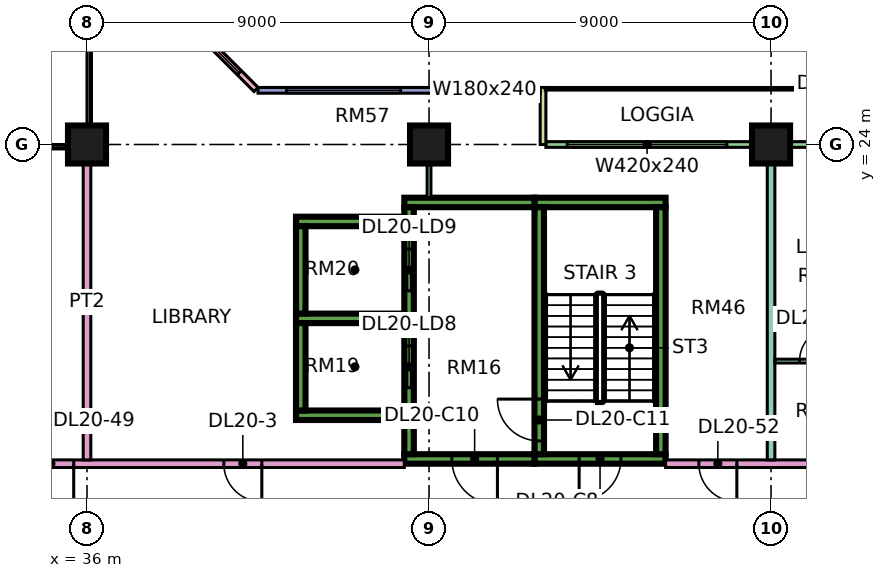
"""IFC4 building model, lengths in metres.
Left out: names, types, materials, properties, quantities, classifications, styles, units other than length and angle.
Written with IfcOpenShell. Run it as: python <this file> out.ifc"""

import sys

from ifc_helpers import new_model, si_unit, direction, frame, frame_2d, origin, origin_2d, place, context, subcontext, project, spatial, rectangle, extrude, element, fill, save


model = new_model("IFC4")
c1 = context("Model", 3, precision=1e-05, world=origin(), true_north=direction((0.0, 1.0)))
c2 = subcontext(c1, "Body", "Model", "MODEL_VIEW")
j1 = project(units=[si_unit("LENGTHUNIT", "METRE"), si_unit("PLANEANGLEUNIT", "RADIAN")], contexts=[c1])
p1 = place(None, origin())
s1 = spatial("IfcSite", under=j1, at=p1, CompositionType="ELEMENT")
p2 = place(p1, origin())
s2 = spatial("IfcBuilding", under=s1, at=p2, CompositionType="ELEMENT")
p3 = place(p2, frame((0.0, 0.0, 91.9)))
s3 = spatial("IfcBuildingStorey", under=s2, at=p3, CompositionType="ELEMENT", Elevation=91.9)
for number, where, z_axis, x_axis in (
    (1, (36.0, 24.0, 0.0), (0.0, 0.0, 1.0), (1.0, 0.0, 0.0)),
    (2, (45.0, 24.0, 0.0), (0.0, 0.0, 1.0), (1.0, 0.0, 0.0)),
    (3, (54.0, 24.0, 0.0), (0.0, 0.0, 1.0), (1.0, 0.0, 0.0)),
):
    element("IfcColumn", number, at=place(p3, frame(where, z_axis=z_axis, x_axis=x_axis)), inside=s3, PredefinedType="COLUMN", context=c2, shape_type="SweptSolid", body=[
        extrude(rectangle(XDim=1.0, YDim=1.0, at=origin_2d()), origin(), (0.0, 0.0, 1.0), 3.75),
    ])
p4 = place(p3, frame((47.775, 15.725, 0.0), z_axis=(0.0, 0.0, 1.0), x_axis=(1.0, 0.0, 0.0)))
e4 = element("IfcWall", 4, at=p4, inside=s3, PredefinedType="SHEAR", context=c2, shape_type="SweptSolid", body=[
    extrude(rectangle(XDim=3.45, YDim=0.25, at=frame_2d((1.725, 0.0))), origin(), (0.0, 0.0, 1.0), 3.75),
])
p5 = place(p4, frame((1.175, 0.0, 0.0)))
e5 = element("IfcOpeningElement", 5, at=p5, cuts=e4, PredefinedType="OPENING", context=c2, shape_type="SweptSolid", body=[
    extrude(rectangle(XDim=1.1, YDim=2.2, at=frame_2d((0.55, 1.1))), frame((0.0, 0.135, 0.0), z_axis=(0.0, -1.0, 0.0), x_axis=(1.0, 0.0, 0.0)), (0.0, 0.0, 1.0), 0.27),
])
p6 = place(p3, frame((47.775, 22.475, 0.0), z_axis=(0.0, 0.0, 1.0), x_axis=(1.0, 0.0, 0.0)))
e6 = element("IfcWall", 6, at=p6, inside=s3, PredefinedType="SHEAR", context=c2, shape_type="SweptSolid", body=[
    extrude(rectangle(XDim=3.45, YDim=0.25, at=frame_2d((1.725, 0.0))), origin(), (0.0, 0.0, 1.0), 3.75),
])
p7 = place(p3, frame((47.9, 15.85, 0.0), z_axis=(0.0, 0.0, 1.0), x_axis=(0.0, 1.0, 0.0)))
e7 = element("IfcWall", 7, at=p7, inside=s3, PredefinedType="SHEAR", context=c2, shape_type="SweptSolid", body=[
    extrude(rectangle(XDim=6.5, YDim=0.25, at=frame_2d((3.25, 0.0))), origin(), (0.0, 0.0, 1.0), 3.75),
])
p8 = place(p7, frame((0.35, 0.0, 0.0)))
e8 = element("IfcOpeningElement", 8, at=p8, cuts=e7, PredefinedType="OPENING", context=c2, shape_type="SweptSolid", body=[
    extrude(rectangle(XDim=1.1, YDim=2.2, at=frame_2d((0.55, 1.1))), frame((0.0, 0.135, 0.0), z_axis=(0.0, -1.0, 0.0), x_axis=(1.0, 0.0, 0.0)), (0.0, 0.0, 1.0), 0.27),
])
p9 = place(p3, frame((51.1, 15.85, 0.0), z_axis=(0.0, 0.0, 1.0), x_axis=(0.0, 1.0, 0.0)))
e9 = element("IfcWall", 9, at=p9, inside=s3, PredefinedType="SHEAR", context=c2, shape_type="SweptSolid", body=[
    extrude(rectangle(XDim=6.5, YDim=0.25, at=frame_2d((3.25, 0.0))), origin(), (0.0, 0.0, 1.0), 3.75),
])
p10 = place(p3, frame((44.35, 15.725, 0.0), z_axis=(0.0, 0.0, 1.0), x_axis=(1.0, 0.0, 0.0)))
e10 = element("IfcWall", 10, at=p10, inside=s3, PredefinedType="SHEAR", context=c2, shape_type="SweptSolid", body=[
    extrude(rectangle(XDim=3.425, YDim=0.25, at=frame_2d((1.712, 0.0))), origin(), (0.0, 0.0, 1.0), 3.75),
])
p11 = place(p10, frame((1.25, 0.0, 0.0)))
e11 = element("IfcOpeningElement", 11, at=p11, cuts=e10, PredefinedType="OPENING", context=c2, shape_type="SweptSolid", body=[
    extrude(rectangle(XDim=1.2, YDim=2.2, at=frame_2d((0.6, 1.1))), frame((0.0, 0.135, 0.0), z_axis=(0.0, -1.0, 0.0), x_axis=(1.0, 0.0, 0.0)), (0.0, 0.0, 1.0), 0.27),
])
p12 = place(p3, frame((44.35, 22.475, 0.0), z_axis=(0.0, 0.0, 1.0), x_axis=(1.0, 0.0, 0.0)))
e12 = element("IfcWall", 12, at=p12, inside=s3, PredefinedType="SHEAR", context=c2, shape_type="SweptSolid", body=[
    extrude(rectangle(XDim=3.425, YDim=0.25, at=frame_2d((1.712, 0.0))), origin(), (0.0, 0.0, 1.0), 3.75),
])
p13 = place(p3, frame((44.475, 15.85, 0.0), z_axis=(0.0, 0.0, 1.0), x_axis=(0.0, 1.0, 0.0)))
e13 = element("IfcWall", 13, at=p13, inside=s3, PredefinedType="SHEAR", context=c2, shape_type="SweptSolid", body=[
    extrude(rectangle(XDim=6.5, YDim=0.25, at=frame_2d((3.25, 0.0))), origin(), (0.0, 0.0, 1.0), 3.75),
])
p14 = place(p13, frame((1.75, 0.0, 0.0)))
e14 = element("IfcOpeningElement", 14, at=p14, cuts=e13, PredefinedType="OPENING", context=c2, shape_type="SweptSolid", body=[
    extrude(rectangle(XDim=1.1, YDim=2.2, at=frame_2d((0.55, 1.1))), frame((0.0, 0.135, 0.0), z_axis=(0.0, -1.0, 0.0), x_axis=(1.0, 0.0, 0.0)), (0.0, 0.0, 1.0), 0.27),
])
p15 = place(p13, frame((4.3, 0.0, 0.0)))
e15 = element("IfcOpeningElement", 15, at=p15, cuts=e13, PredefinedType="OPENING", context=c2, shape_type="SweptSolid", body=[
    extrude(rectangle(XDim=1.1, YDim=2.2, at=frame_2d((0.55, 1.1))), frame((0.0, 0.135, 0.0), z_axis=(0.0, -1.0, 0.0), x_axis=(1.0, 0.0, 0.0)), (0.0, 0.0, 1.0), 0.27),
])
for number, where, z_axis, x_axis in (
    (16, (41.5, 16.875, 0.0), (0.0, 0.0, 1.0), (1.0, 0.0, 0.0)),
    (17, (41.5, 19.425, 0.0), (0.0, 0.0, 1.0), (1.0, 0.0, 0.0)),
    (18, (41.5, 21.975, 0.0), (0.0, 0.0, 1.0), (1.0, 0.0, 0.0)),
):
    element("IfcWall", number, at=place(p3, frame(where, z_axis=z_axis, x_axis=x_axis)), inside=s3, PredefinedType="SHEAR", context=c2, shape_type="SweptSolid", body=[
        extrude(rectangle(XDim=2.85, YDim=0.25, at=frame_2d((1.425, 0.0))), origin(), (0.0, 0.0, 1.0), 3.75),
    ])
for number, where, z_axis, x_axis in (
    (19, (41.625, 17.0, 0.0), (0.0, 0.0, 1.0), (0.0, 1.0, 0.0)),
    (20, (41.625, 19.55, 0.0), (0.0, 0.0, 1.0), (0.0, 1.0, 0.0)),
):
    element("IfcWall", number, at=place(p3, frame(where, z_axis=z_axis, x_axis=x_axis)), inside=s3, PredefinedType="SHEAR", context=c2, shape_type="SweptSolid", body=[
        extrude(rectangle(XDim=2.3, YDim=0.25, at=frame_2d((1.15, 0.0))), origin(), (0.0, 0.0, 1.0), 3.75),
    ])
p16 = place(p3, frame((59.925, 24.0, 0.0), z_axis=(0.0, 0.0, 1.0), x_axis=(-1.0, 0.0, 0.0)))
e21 = element("IfcWall", 21, at=p16, inside=s3, PredefinedType="SOLIDWALL", context=c2, shape_type="SweptSolid", body=[
    extrude(rectangle(XDim=11.85, YDim=0.15, at=frame_2d((5.925, 0.0))), origin(), (0.0, 0.0, 1.0), 3.35),
])
p17 = place(p16, frame((0.562, 0.0, 0.45)))
e22 = element("IfcOpeningElement", 22, at=p17, cuts=e21, PredefinedType="OPENING", context=c2, shape_type="SweptSolid", body=[
    extrude(rectangle(XDim=1.8, YDim=2.4, at=frame_2d((0.9, 1.2))), frame((0.0, 0.085, 0.0), z_axis=(0.0, -1.0, 0.0), x_axis=(1.0, 0.0, 0.0)), (0.0, 0.0, 1.0), 0.17),
])
p18 = place(p16, frame((3.525, 0.0, 0.0)))
e23 = element("IfcOpeningElement", 23, at=p18, cuts=e21, PredefinedType="OPENING", context=c2, shape_type="SweptSolid", body=[
    extrude(rectangle(XDim=1.2, YDim=2.4, at=frame_2d((0.6, 1.2))), frame((0.0, 0.085, 0.0), z_axis=(0.0, -1.0, 0.0), x_axis=(1.0, 0.0, 0.0)), (0.0, 0.0, 1.0), 0.17),
])
p19 = place(p16, frame((7.087, 0.0, 0.45)))
e24 = element("IfcOpeningElement", 24, at=p19, cuts=e21, PredefinedType="OPENING", context=c2, shape_type="SweptSolid", body=[
    extrude(rectangle(XDim=4.2, YDim=2.4, at=frame_2d((2.1, 1.2))), frame((0.0, 0.085, 0.0), z_axis=(0.0, -1.0, 0.0), x_axis=(1.0, 0.0, 0.0)), (0.0, 0.0, 1.0), 0.17),
])
p20 = place(p3, frame((48.0, 25.5, 0.0), z_axis=(0.0, 0.0, 1.0), x_axis=(0.0, -1.0, 0.0)))
e25 = element("IfcWall", 25, at=p20, inside=s3, PredefinedType="SOLIDWALL", context=c2, shape_type="SweptSolid", body=[
    extrude(rectangle(XDim=1.5, YDim=0.15, at=frame_2d((0.75, 0.0))), origin(), (0.0, 0.0, 1.0), 3.35),
])
p21 = place(p3, frame((47.925, 25.425, 0.0), z_axis=(0.0, 0.0, 1.0), x_axis=(-1.0, 0.0, 0.0)))
e26 = element("IfcWall", 26, at=p21, inside=s3, PredefinedType="SOLIDWALL", context=c2, shape_type="SweptSolid", body=[
    extrude(rectangle(XDim=7.425, YDim=0.15, at=frame_2d((3.712, 0.0))), origin(), (0.0, 0.0, 1.0), 3.35),
])
p22 = place(p21, frame((0.562, 0.0, 0.45)))
e27 = element("IfcOpeningElement", 27, at=p22, cuts=e26, PredefinedType="OPENING", context=c2, shape_type="SweptSolid", body=[
    extrude(rectangle(XDim=1.8, YDim=2.4, at=frame_2d((0.9, 1.2))), frame((0.0, 0.085, 0.0), z_axis=(0.0, -1.0, 0.0), x_axis=(1.0, 0.0, 0.0)), (0.0, 0.0, 1.0), 0.17),
])
p23 = place(p21, frame((3.675, 0.0, 0.45)))
e28 = element("IfcOpeningElement", 28, at=p23, cuts=e26, PredefinedType="OPENING", context=c2, shape_type="SweptSolid", body=[
    extrude(rectangle(XDim=3.0, YDim=2.4, at=frame_2d((1.5, 1.2))), frame((0.0, 0.085, 0.0), z_axis=(0.0, -1.0, 0.0), x_axis=(1.0, 0.0, 0.0)), (0.0, 0.0, 1.0), 0.17),
])
p24 = place(p3, frame((40.447, 25.447, 0.0), z_axis=(0.0, 0.0, 1.0), x_axis=(-0.707106781187, 0.707106781187, 0.0)))
e29 = element("IfcWall", 29, at=p24, inside=s3, PredefinedType="SOLIDWALL", context=c2, shape_type="SweptSolid", body=[
    extrude(rectangle(XDim=4.243, YDim=0.15, at=frame_2d((2.121, 0.0))), origin(), (0.0, 0.0, 1.0), 3.35),
])
p25 = place(p24, frame((0.621, 0.0, 0.45)))
e30 = element("IfcOpeningElement", 30, at=p25, cuts=e29, PredefinedType="OPENING", context=c2, shape_type="SweptSolid", body=[
    extrude(rectangle(XDim=3.0, YDim=2.4, at=frame_2d((1.5, 1.2))), frame((0.0, 0.085, 0.0), z_axis=(0.0, -1.0, 0.0), x_axis=(1.0, 0.0, 0.0)), (0.0, 0.0, 1.0), 0.17),
])
p26 = place(p3, frame((34.0, 15.6, 0.0), z_axis=(0.0, 0.0, 1.0), x_axis=(1.0, 0.0, 0.0)))
e31 = element("IfcWall", 31, at=p26, inside=s3, PredefinedType="PARTITIONING", context=c2, shape_type="SweptSolid", body=[
    extrude(rectangle(XDim=10.35, YDim=0.2, at=frame_2d((5.175, 0.0))), origin(), (0.0, 0.0, 1.0), 3.35),
])
p27 = place(p26, frame((5.6, 0.0, 0.0)))
e32 = element("IfcOpeningElement", 32, at=p27, cuts=e31, PredefinedType="OPENING", context=c2, shape_type="SweptSolid", body=[
    extrude(rectangle(XDim=1.0, YDim=2.1, at=frame_2d((0.5, 1.05))), frame((0.0, 0.11, 0.0), z_axis=(0.0, -1.0, 0.0), x_axis=(1.0, 0.0, 0.0)), (0.0, 0.0, 1.0), 0.22),
])
p28 = place(p26, frame((0.45, 0.0, 0.0)))
e33 = element("IfcOpeningElement", 33, at=p28, cuts=e31, PredefinedType="OPENING", context=c2, shape_type="SweptSolid", body=[
    extrude(rectangle(XDim=1.2, YDim=2.1, at=frame_2d((0.6, 1.05))), frame((0.0, 0.11, 0.0), z_axis=(0.0, -1.0, 0.0), x_axis=(1.0, 0.0, 0.0)), (0.0, 0.0, 1.0), 0.22),
])
p29 = place(p3, frame((36.0, 15.7, 0.0), z_axis=(0.0, 0.0, 1.0), x_axis=(0.0, 1.0, 0.0)))
e34 = element("IfcWall", 34, at=p29, inside=s3, PredefinedType="PARTITIONING", context=c2, shape_type="SweptSolid", body=[
    extrude(rectangle(XDim=8.3, YDim=0.2, at=frame_2d((4.15, 0.0))), origin(), (0.0, 0.0, 1.0), 3.35),
])
p30 = place(p3, frame((45.0, 22.6, 0.0), z_axis=(0.0, 0.0, 1.0), x_axis=(0.0, 1.0, 0.0)))
e35 = element("IfcWall", 35, at=p30, inside=s3, PredefinedType="PARTITIONING", context=c2, shape_type="SweptSolid", body=[
    extrude(rectangle(XDim=1.4, YDim=0.1, at=frame_2d((0.7, 0.0))), origin(), (0.0, 0.0, 1.0), 3.35),
])
p31 = place(p3, frame((51.225, 15.6, 0.0), z_axis=(0.0, 0.0, 1.0), x_axis=(1.0, 0.0, 0.0)))
e36 = element("IfcWall", 36, at=p31, inside=s3, PredefinedType="PARTITIONING", context=c2, shape_type="SweptSolid", body=[
    extrude(rectangle(XDim=22.125, YDim=0.2, at=frame_2d((11.062, 0.0))), origin(), (0.0, 0.0, 1.0), 3.35),
])
p32 = place(p31, frame((6.125, 0.0, 0.0)))
e37 = element("IfcOpeningElement", 37, at=p32, cuts=e36, PredefinedType="OPENING", context=c2, shape_type="SweptSolid", body=[
    extrude(rectangle(XDim=1.0, YDim=2.1, at=frame_2d((0.5, 1.05))), frame((0.0, 0.11, 0.0), z_axis=(0.0, -1.0, 0.0), x_axis=(1.0, 0.0, 0.0)), (0.0, 0.0, 1.0), 0.22),
])
p33 = place(p31, frame((0.875, 0.0, 0.0)))
e38 = element("IfcOpeningElement", 38, at=p33, cuts=e36, PredefinedType="OPENING", context=c2, shape_type="SweptSolid", body=[
    extrude(rectangle(XDim=1.0, YDim=2.1, at=frame_2d((0.5, 1.05))), frame((0.0, 0.11, 0.0), z_axis=(0.0, -1.0, 0.0), x_axis=(1.0, 0.0, 0.0)), (0.0, 0.0, 1.0), 0.22),
])
p34 = place(p3, frame((54.0, 15.7, 0.0), z_axis=(0.0, 0.0, 1.0), x_axis=(0.0, 1.0, 0.0)))
e39 = element("IfcWall", 39, at=p34, inside=s3, PredefinedType="PARTITIONING", context=c2, shape_type="SweptSolid", body=[
    extrude(rectangle(XDim=8.226, YDim=0.2, at=frame_2d((4.113, 0.0))), origin(), (0.0, 0.0, 1.0), 3.35),
])
p35 = place(p3, frame((54.1, 18.3, 0.0), z_axis=(0.0, 0.0, 1.0), x_axis=(1.0, 0.0, 0.0)))
e40 = element("IfcWall", 40, at=p35, inside=s3, PredefinedType="PARTITIONING", context=c2, shape_type="SweptSolid", body=[
    extrude(rectangle(XDim=2.25, YDim=0.1, at=frame_2d((1.125, 0.0))), origin(), (0.0, 0.0, 1.0), 3.35),
])
p36 = place(p35, frame((0.65, 0.0, 0.0)))
e41 = element("IfcOpeningElement", 41, at=p36, cuts=e40, PredefinedType="OPENING", context=c2, shape_type="SweptSolid", body=[
    extrude(rectangle(XDim=0.9, YDim=2.1, at=frame_2d((0.45, 1.05))), frame((0.0, 0.06, 0.0), z_axis=(0.0, -1.0, 0.0), x_axis=(1.0, 0.0, 0.0)), (0.0, 0.0, 1.0), 0.12),
])
p37 = place(p19, origin())
e42 = element("IfcWindow", 42, at=p37, inside=s3, PartitioningType="SINGLE_PANEL", PredefinedType="WINDOW", context=c2, shape_type="SweptSolid", body=[
    extrude(rectangle(XDim=4.2, YDim=2.4, at=frame_2d((2.1, 1.2))), frame((0.0, 0.03, 0.0), z_axis=(0.0, -1.0, 0.0), x_axis=(1.0, 0.0, 0.0)), (0.0, 0.0, 1.0), 0.06),
])
fill(e24, e42)
p38 = place(p22, origin())
e43 = element("IfcWindow", 43, at=p38, inside=s3, PartitioningType="SINGLE_PANEL", PredefinedType="WINDOW", context=c2, shape_type="SweptSolid", body=[
    extrude(rectangle(XDim=1.8, YDim=2.4, at=frame_2d((0.9, 1.2))), frame((0.0, 0.03, 0.0), z_axis=(0.0, -1.0, 0.0), x_axis=(1.0, 0.0, 0.0)), (0.0, 0.0, 1.0), 0.06),
])
fill(e27, e43)
p39 = place(p23, origin())
e44 = element("IfcWindow", 44, at=p39, inside=s3, PartitioningType="SINGLE_PANEL", PredefinedType="WINDOW", context=c2, shape_type="SweptSolid", body=[
    extrude(rectangle(XDim=3.0, YDim=2.4, at=frame_2d((1.5, 1.2))), frame((0.0, 0.03, 0.0), z_axis=(0.0, -1.0, 0.0), x_axis=(1.0, 0.0, 0.0)), (0.0, 0.0, 1.0), 0.06),
])
fill(e28, e44)
p40 = place(p25, origin())
e45 = element("IfcWindow", 45, at=p40, inside=s3, PartitioningType="SINGLE_PANEL", PredefinedType="WINDOW", context=c2, shape_type="SweptSolid", body=[
    extrude(rectangle(XDim=3.0, YDim=2.4, at=frame_2d((1.5, 1.2))), frame((0.0, 0.03, 0.0), z_axis=(0.0, -1.0, 0.0), x_axis=(1.0, 0.0, 0.0)), (0.0, 0.0, 1.0), 0.06),
])
fill(e30, e45)
p41 = place(p5, frame((1.1, 0.0, 0.0), z_axis=(0.0, 0.0, 1.0), x_axis=(-1.0, 0.0, 0.0)))
e46 = element("IfcDoor", 46, at=p41, inside=s3, OperationType="SINGLE_SWING_LEFT", PredefinedType="DOOR", context=c2, shape_type="SweptSolid", body=[
    extrude(rectangle(XDim=1.1, YDim=2.2, at=frame_2d((0.55, 1.1))), frame((0.0, 0.025, 0.0), z_axis=(0.0, -1.0, 0.0), x_axis=(1.0, 0.0, 0.0)), (0.0, 0.0, 1.0), 0.05),
])
fill(e5, e46)
p42 = place(p11, origin())
e47 = element("IfcDoor", 47, at=p42, inside=s3, OperationType="SINGLE_SWING_RIGHT", PredefinedType="DOOR", context=c2, shape_type="SweptSolid", body=[
    extrude(rectangle(XDim=1.2, YDim=2.2, at=frame_2d((0.6, 1.1))), frame((0.0, 0.025, 0.0), z_axis=(0.0, -1.0, 0.0), x_axis=(1.0, 0.0, 0.0)), (0.0, 0.0, 1.0), 0.05),
])
fill(e11, e47)
p43 = place(p8, frame((1.1, 0.0, 0.0), z_axis=(0.0, 0.0, 1.0), x_axis=(-1.0, 0.0, 0.0)))
e48 = element("IfcDoor", 48, at=p43, inside=s3, OperationType="SINGLE_SWING_RIGHT", PredefinedType="DOOR", context=c2, shape_type="SweptSolid", body=[
    extrude(rectangle(XDim=1.1, YDim=2.2, at=frame_2d((0.55, 1.1))), frame((0.0, 0.025, 0.0), z_axis=(0.0, -1.0, 0.0), x_axis=(1.0, 0.0, 0.0)), (0.0, 0.0, 1.0), 0.05),
])
fill(e8, e48)
p44 = place(p14, origin())
e49 = element("IfcDoor", 49, at=p44, inside=s3, OperationType="DOUBLE_DOOR_SLIDING", PredefinedType="DOOR", context=c2, shape_type="SweptSolid", body=[
    extrude(rectangle(XDim=1.1, YDim=2.2, at=frame_2d((0.55, 1.1))), frame((0.0, 0.025, 0.0), z_axis=(0.0, -1.0, 0.0), x_axis=(1.0, 0.0, 0.0)), (0.0, 0.0, 1.0), 0.05),
])
fill(e14, e49)
p45 = place(p15, origin())
e50 = element("IfcDoor", 50, at=p45, inside=s3, OperationType="DOUBLE_DOOR_SLIDING", PredefinedType="DOOR", context=c2, shape_type="SweptSolid", body=[
    extrude(rectangle(XDim=1.1, YDim=2.2, at=frame_2d((0.55, 1.1))), frame((0.0, 0.025, 0.0), z_axis=(0.0, -1.0, 0.0), x_axis=(1.0, 0.0, 0.0)), (0.0, 0.0, 1.0), 0.05),
])
fill(e15, e50)
p46 = place(p27, origin())
e51 = element("IfcDoor", 51, at=p46, inside=s3, OperationType="SINGLE_SWING_RIGHT", PredefinedType="DOOR", context=c2, shape_type="SweptSolid", body=[
    extrude(rectangle(XDim=1.0, YDim=2.1, at=frame_2d((0.5, 1.05))), frame((0.0, 0.025, 0.0), z_axis=(0.0, -1.0, 0.0), x_axis=(1.0, 0.0, 0.0)), (0.0, 0.0, 1.0), 0.05),
])
fill(e32, e51)
p47 = place(p36, frame((0.9, 0.0, 0.0), z_axis=(0.0, 0.0, 1.0), x_axis=(-1.0, 0.0, 0.0)))
e52 = element("IfcDoor", 52, at=p47, inside=s3, OperationType="SINGLE_SWING_RIGHT", PredefinedType="DOOR", context=c2, shape_type="SweptSolid", body=[
    extrude(rectangle(XDim=0.9, YDim=2.1, at=frame_2d((0.45, 1.05))), frame((0.0, 0.025, 0.0), z_axis=(0.0, -1.0, 0.0), x_axis=(1.0, 0.0, 0.0)), (0.0, 0.0, 1.0), 0.05),
])
fill(e41, e52)
p48 = place(p28, origin())
e53 = element("IfcDoor", 53, at=p48, inside=s3, OperationType="SINGLE_SWING_RIGHT", PredefinedType="DOOR", context=c2, shape_type="SweptSolid", body=[
    extrude(rectangle(XDim=1.2, YDim=2.1, at=frame_2d((0.6, 1.05))), frame((0.0, 0.025, 0.0), z_axis=(0.0, -1.0, 0.0), x_axis=(1.0, 0.0, 0.0)), (0.0, 0.0, 1.0), 0.05),
])
fill(e33, e53)
p49 = place(p33, origin())
e54 = element("IfcDoor", 54, at=p49, inside=s3, OperationType="SINGLE_SWING_RIGHT", PredefinedType="DOOR", context=c2, shape_type="SweptSolid", body=[
    extrude(rectangle(XDim=1.0, YDim=2.1, at=frame_2d((0.5, 1.05))), frame((0.0, 0.025, 0.0), z_axis=(0.0, -1.0, 0.0), x_axis=(1.0, 0.0, 0.0)), (0.0, 0.0, 1.0), 0.05),
])
fill(e38, e54)
save(model, sys.argv[1])
